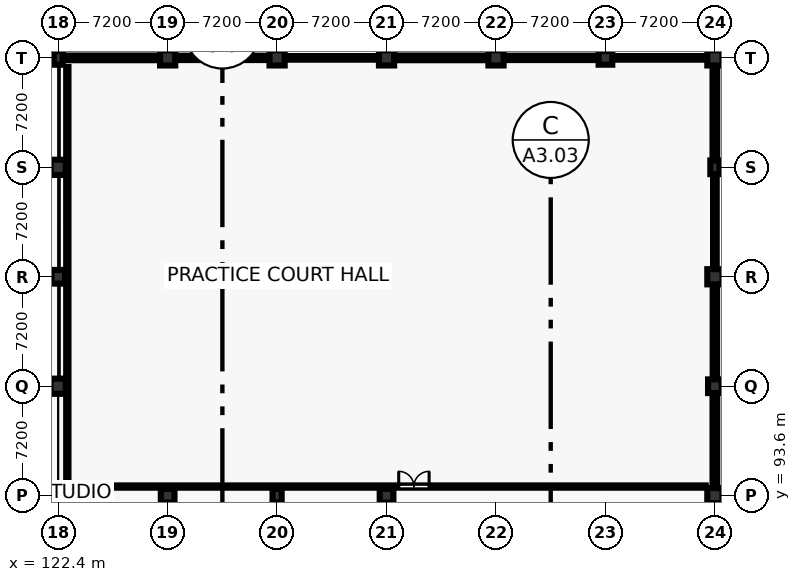
"""IFC4 building model, lengths in metres.
Left out: names, types, materials, properties, quantities, classifications, styles, units other than length and angle.
Written with IfcOpenShell. Run it as: python <this file> out.ifc"""

import sys

from ifc_helpers import new_model, si_unit, direction, frame, frame_2d, origin, origin_2d, place, context, subcontext, project, spatial, rectangle, circle, extrude, element, fill, save


model = new_model("IFC4")
c1 = context("Model", 3, precision=1e-05, world=origin(), true_north=direction((0.0, 1.0)))
c2 = subcontext(c1, "Body", "Model", "MODEL_VIEW")
j1 = project(units=[si_unit("LENGTHUNIT", "METRE"), si_unit("PLANEANGLEUNIT", "RADIAN")], contexts=[c1])
p1 = place(None, origin())
s1 = spatial("IfcSite", under=j1, at=p1, CompositionType="ELEMENT")
p2 = place(p1, origin())
s2 = spatial("IfcBuilding", under=s1, at=p2, CompositionType="ELEMENT")
p3 = place(p2, origin())
s3 = spatial("IfcBuildingStorey", under=s2, at=p3, CompositionType="ELEMENT", Elevation=0.0)
p4 = place(p3, frame((122.4, 93.6, 0.0), z_axis=(0.0, 0.0, 1.0), x_axis=(1.0, 0.0, 0.0)))
e1 = element("IfcColumn", 1, at=p4, inside=s3, PredefinedType="COLUMN", context=c2, shape_type="SweptSolid", body=[
    extrude(rectangle(XDim=0.6, YDim=0.9, at=origin_2d()), origin(), (0.0, 0.0, 1.0), 5.4),
])
p5 = place(p3, frame((122.4, 100.8, 0.0), z_axis=(0.0, 0.0, 1.0), x_axis=(1.0, 0.0, 0.0)))
e2 = element("IfcColumn", 2, at=p5, inside=s3, PredefinedType="COLUMN", context=c2, shape_type="SweptSolid", body=[
    extrude(rectangle(XDim=1.0, YDim=1.0, at=origin_2d()), origin(), (0.0, 0.0, 1.0), 5.4),
])
p6 = place(p3, frame((122.4, 108.0, 0.0), z_axis=(0.0, 0.0, 1.0), x_axis=(1.0, 0.0, 0.0)))
e3 = element("IfcColumn", 3, at=p6, inside=s3, PredefinedType="COLUMN", context=c2, shape_type="SweptSolid", body=[
    extrude(rectangle(XDim=0.9, YDim=0.9, at=origin_2d()), origin(), (0.0, 0.0, 1.0), 5.4),
])
p7 = place(p3, frame((122.4, 115.2, 0.0), z_axis=(0.0, 0.0, 1.0), x_axis=(1.0, 0.0, 0.0)))
e4 = element("IfcColumn", 4, at=p7, inside=s3, PredefinedType="COLUMN", context=c2, shape_type="SweptSolid", body=[
    extrude(circle(Radius=0.5, at=origin_2d()), origin(), (0.0, 0.0, 1.0), 5.4),
])
p8 = place(p3, frame((122.4, 122.4, 0.0), z_axis=(0.0, 0.0, 1.0), x_axis=(1.0, 0.0, 0.0)))
e5 = element("IfcColumn", 5, at=p8, inside=s3, PredefinedType="COLUMN", context=c2, shape_type="SweptSolid", body=[
    extrude(rectangle(XDim=0.6, YDim=0.9, at=origin_2d()), origin(), (0.0, 0.0, 1.0), 5.4),
])
p9 = place(p3, frame((129.6, 93.6, 0.0), z_axis=(0.0, 0.0, 1.0), x_axis=(1.0, 0.0, 0.0)))
e6 = element("IfcColumn", 6, at=p9, inside=s3, PredefinedType="COLUMN", context=c2, shape_type="SweptSolid", body=[
    extrude(rectangle(XDim=0.9, YDim=0.9, at=origin_2d()), origin(), (0.0, 0.0, 1.0), 5.4),
])
p10 = place(p3, frame((129.6, 122.4, 0.0), z_axis=(0.0, 0.0, 1.0), x_axis=(1.0, 0.0, 0.0)))
e7 = element("IfcColumn", 7, at=p10, inside=s3, PredefinedType="COLUMN", context=c2, shape_type="SweptSolid", body=[
    extrude(circle(Radius=0.5, at=origin_2d()), origin(), (0.0, 0.0, 1.0), 5.4),
])
p11 = place(p3, frame((136.8, 93.6, 0.0), z_axis=(0.0, 0.0, 1.0), x_axis=(1.0, 0.0, 0.0)))
e8 = element("IfcColumn", 8, at=p11, inside=s3, PredefinedType="COLUMN", context=c2, shape_type="SweptSolid", body=[
    extrude(rectangle(XDim=0.6, YDim=0.9, at=origin_2d()), origin(), (0.0, 0.0, 1.0), 5.4),
])
p12 = place(p3, frame((136.8, 122.4, 0.0), z_axis=(0.0, 0.0, 1.0), x_axis=(1.0, 0.0, 0.0)))
e9 = element("IfcColumn", 9, at=p12, inside=s3, PredefinedType="COLUMN", context=c2, shape_type="SweptSolid", body=[
    extrude(rectangle(XDim=1.0, YDim=1.0, at=origin_2d()), origin(), (0.0, 0.0, 1.0), 5.4),
])
p13 = place(p3, frame((144.0, 93.6, 0.0), z_axis=(0.0, 0.0, 1.0), x_axis=(1.0, 0.0, 0.0)))
e10 = element("IfcColumn", 10, at=p13, inside=s3, PredefinedType="COLUMN", context=c2, shape_type="SweptSolid", body=[
    extrude(rectangle(XDim=0.9, YDim=0.9, at=origin_2d()), origin(), (0.0, 0.0, 1.0), 5.4),
])
for number, where, z_axis, x_axis in (
    (11, (144.0, 122.4, 0.0), (0.0, 0.0, 1.0), (1.0, 0.0, 0.0)),
    (12, (151.2, 122.4, 0.0), (0.0, 0.0, 1.0), (1.0, 0.0, 0.0)),
):
    element("IfcColumn", number, at=place(p3, frame(where, z_axis=z_axis, x_axis=x_axis)), inside=s3, PredefinedType="COLUMN", context=c2, shape_type="SweptSolid", body=[
        extrude(circle(Radius=0.5, at=origin_2d()), origin(), (0.0, 0.0, 1.0), 5.4),
    ])
p14 = place(p3, frame((158.4, 122.4, 0.0), z_axis=(0.0, 0.0, 1.0), x_axis=(1.0, 0.0, 0.0)))
e13 = element("IfcColumn", 13, at=p14, inside=s3, PredefinedType="COLUMN", context=c2, shape_type="SweptSolid", body=[
    extrude(rectangle(XDim=0.9, YDim=0.9, at=origin_2d()), origin(), (0.0, 0.0, 1.0), 5.4),
])
p15 = place(p3, frame((165.6, 93.6, 0.0), z_axis=(0.0, 0.0, 1.0), x_axis=(1.0, 0.0, 0.0)))
e14 = element("IfcColumn", 14, at=p15, inside=s3, PredefinedType="COLUMN", context=c2, shape_type="SweptSolid", body=[
    extrude(rectangle(XDim=1.0, YDim=1.0, at=origin_2d()), origin(), (0.0, 0.0, 1.0), 5.4),
])
p16 = place(p3, frame((165.6, 100.8, 0.0), z_axis=(0.0, 0.0, 1.0), x_axis=(1.0, 0.0, 0.0)))
e15 = element("IfcColumn", 15, at=p16, inside=s3, PredefinedType="COLUMN", context=c2, shape_type="SweptSolid", body=[
    extrude(rectangle(XDim=0.9, YDim=0.9, at=origin_2d()), origin(), (0.0, 0.0, 1.0), 5.4),
])
p17 = place(p3, frame((165.6, 108.0, 0.0), z_axis=(0.0, 0.0, 1.0), x_axis=(1.0, 0.0, 0.0)))
e16 = element("IfcColumn", 16, at=p17, inside=s3, PredefinedType="COLUMN", context=c2, shape_type="SweptSolid", body=[
    extrude(circle(Radius=0.5, at=origin_2d()), origin(), (0.0, 0.0, 1.0), 5.4),
])
p18 = place(p3, frame((165.6, 115.2, 0.0), z_axis=(0.0, 0.0, 1.0), x_axis=(1.0, 0.0, 0.0)))
e17 = element("IfcColumn", 17, at=p18, inside=s3, PredefinedType="COLUMN", context=c2, shape_type="SweptSolid", body=[
    extrude(rectangle(XDim=0.6, YDim=0.9, at=origin_2d()), origin(), (0.0, 0.0, 1.0), 5.4),
])
p19 = place(p3, frame((165.6, 122.4, 0.0), z_axis=(0.0, 0.0, 1.0), x_axis=(1.0, 0.0, 0.0)))
e18 = element("IfcColumn", 18, at=p19, inside=s3, PredefinedType="COLUMN", context=c2, shape_type="SweptSolid", body=[
    extrude(rectangle(XDim=1.0, YDim=1.0, at=origin_2d()), origin(), (0.0, 0.0, 1.0), 5.4),
])
p20 = place(p3, frame((165.6, 122.4, 0.0), z_axis=(0.0, 0.0, 1.0), x_axis=(0.0, 1.0, 0.0)))
e19 = element("IfcWall", 19, at=p20, inside=s3, PredefinedType="SOLIDWALL", context=c2, shape_type="SweptSolid", body=[
    extrude(rectangle(XDim=6.9, YDim=0.34, at=frame_2d((3.45, 0.0))), origin(), (0.0, 0.0, 1.0), 4.85),
])
p21 = place(p20, frame((0.95, 0.0, 0.0)))
e20 = element("IfcOpeningElement", 20, at=p21, cuts=e19, PredefinedType="OPENING", context=c2, shape_type="SweptSolid", body=[
    extrude(rectangle(XDim=5.0, YDim=4.4, at=frame_2d((2.5, 2.2))), frame((0.0, 0.18, 0.0), z_axis=(0.0, -1.0, 0.0), x_axis=(1.0, 0.0, 0.0)), (0.0, 0.0, 1.0), 0.36),
])
p22 = place(p3, frame((115.55, 122.4, 0.0), z_axis=(0.0, 0.0, 1.0), x_axis=(1.0, 0.0, 0.0)))
e21 = element("IfcWall", 21, at=p22, inside=s3, PredefinedType="SOLIDWALL", context=c2, shape_type="SweptSolid", body=[
    extrude(rectangle(XDim=6.5, YDim=0.31, at=frame_2d((3.25, 0.0))), origin(), (0.0, 0.0, 1.0), 4.1),
])
p23 = place(p22, frame((2.3, 0.0, 0.0)))
e22 = element("IfcOpeningElement", 22, at=p23, cuts=e21, PredefinedType="OPENING", context=c2, shape_type="SweptSolid", body=[
    extrude(rectangle(XDim=1.9, YDim=2.4, at=frame_2d((0.95, 1.2))), frame((0.0, 0.165, 0.0), z_axis=(0.0, -1.0, 0.0), x_axis=(1.0, 0.0, 0.0)), (0.0, 0.0, 1.0), 0.33),
])
p24 = place(p3, frame((122.65, 122.4, 0.0), z_axis=(0.0, 0.0, 1.0), x_axis=(1.0, 0.0, 0.0)))
e23 = element("IfcWall", 23, at=p24, inside=s3, PredefinedType="SOLIDWALL", context=c2, shape_type="SweptSolid", body=[
    extrude(rectangle(XDim=6.7, YDim=0.31, at=frame_2d((3.35, 0.0))), origin(), (0.0, 0.0, 1.0), 4.1),
])
p25 = place(p24, frame((2.15, 0.0, 0.9)))
e24 = element("IfcOpeningElement", 24, at=p25, cuts=e23, PredefinedType="OPENING", context=c2, shape_type="SweptSolid", body=[
    extrude(rectangle(XDim=2.4, YDim=1.8, at=frame_2d((1.2, 0.9))), frame((0.0, 0.165, 0.0), z_axis=(0.0, -1.0, 0.0), x_axis=(1.0, 0.0, 0.0)), (0.0, 0.0, 1.0), 0.33),
])
p26 = place(p3, frame((129.85, 122.4, 0.0), z_axis=(0.0, 0.0, 1.0), x_axis=(1.0, 0.0, 0.0)))
e25 = element("IfcWall", 25, at=p26, inside=s3, PredefinedType="SOLIDWALL", context=c2, shape_type="SweptSolid", body=[
    extrude(rectangle(XDim=6.7, YDim=0.29, at=frame_2d((3.35, 0.0))), origin(), (0.0, 0.0, 1.0), 4.1),
])
p27 = place(p26, frame((2.3, 0.0, 0.9)))
e26 = element("IfcOpeningElement", 26, at=p27, cuts=e25, PredefinedType="OPENING", context=c2, shape_type="SweptSolid", body=[
    extrude(rectangle(XDim=2.1, YDim=1.8, at=frame_2d((1.05, 0.9))), frame((0.0, 0.155, 0.0), z_axis=(0.0, -1.0, 0.0), x_axis=(1.0, 0.0, 0.0)), (0.0, 0.0, 1.0), 0.31),
])
p28 = place(p3, frame((137.05, 122.4, 0.0), z_axis=(0.0, 0.0, 1.0), x_axis=(1.0, 0.0, 0.0)))
e27 = element("IfcWall", 27, at=p28, inside=s3, PredefinedType="SOLIDWALL", context=c2, shape_type="SweptSolid", body=[
    extrude(rectangle(XDim=6.7, YDim=0.24, at=frame_2d((3.35, 0.0))), origin(), (0.0, 0.0, 1.0), 4.1),
])
p29 = place(p28, frame((2.45, 0.0, 0.9)))
e28 = element("IfcOpeningElement", 28, at=p29, cuts=e27, PredefinedType="OPENING", context=c2, shape_type="SweptSolid", body=[
    extrude(rectangle(XDim=1.8, YDim=1.8, at=frame_2d((0.9, 0.9))), frame((0.0, 0.13, 0.0), z_axis=(0.0, -1.0, 0.0), x_axis=(1.0, 0.0, 0.0)), (0.0, 0.0, 1.0), 0.26),
])
p30 = place(p3, frame((144.25, 122.4, 0.0), z_axis=(0.0, 0.0, 1.0), x_axis=(1.0, 0.0, 0.0)))
e29 = element("IfcWall", 29, at=p30, inside=s3, PredefinedType="SOLIDWALL", context=c2, shape_type="SweptSolid", body=[
    extrude(rectangle(XDim=6.7, YDim=0.31, at=frame_2d((3.35, 0.0))), origin(), (0.0, 0.0, 1.0), 4.1),
])
p31 = place(p30, frame((2.45, 0.0, 0.9)))
e30 = element("IfcOpeningElement", 30, at=p31, cuts=e29, PredefinedType="OPENING", context=c2, shape_type="SweptSolid", body=[
    extrude(rectangle(XDim=1.8, YDim=1.5, at=frame_2d((0.9, 0.75))), frame((0.0, 0.165, 0.0), z_axis=(0.0, -1.0, 0.0), x_axis=(1.0, 0.0, 0.0)), (0.0, 0.0, 1.0), 0.33),
])
p32 = place(p3, frame((151.45, 122.4, 0.0), z_axis=(0.0, 0.0, 1.0), x_axis=(1.0, 0.0, 0.0)))
e31 = element("IfcWall", 31, at=p32, inside=s3, PredefinedType="SOLIDWALL", context=c2, shape_type="SweptSolid", body=[
    extrude(rectangle(XDim=6.7, YDim=0.29, at=frame_2d((3.35, 0.0))), origin(), (0.0, 0.0, 1.0), 4.1),
])
p33 = place(p32, frame((2.6, 0.0, 0.9)))
e32 = element("IfcOpeningElement", 32, at=p33, cuts=e31, PredefinedType="OPENING", context=c2, shape_type="SweptSolid", body=[
    extrude(rectangle(XDim=1.5, YDim=1.5, at=frame_2d((0.75, 0.75))), frame((0.0, 0.155, 0.0), z_axis=(0.0, -1.0, 0.0), x_axis=(1.0, 0.0, 0.0)), (0.0, 0.0, 1.0), 0.31),
])
p34 = place(p3, frame((158.65, 122.4, 0.0), z_axis=(0.0, 0.0, 1.0), x_axis=(1.0, 0.0, 0.0)))
e33 = element("IfcWall", 33, at=p34, inside=s3, PredefinedType="SOLIDWALL", context=c2, shape_type="SweptSolid", body=[
    extrude(rectangle(XDim=6.7, YDim=0.24, at=frame_2d((3.35, 0.0))), origin(), (0.0, 0.0, 1.0), 4.1),
])
p35 = place(p34, frame((2.75, 0.0, 0.9)))
e34 = element("IfcOpeningElement", 34, at=p35, cuts=e33, PredefinedType="OPENING", context=c2, shape_type="SweptSolid", body=[
    extrude(rectangle(XDim=1.2, YDim=1.5, at=frame_2d((0.6, 0.75))), frame((0.0, 0.13, 0.0), z_axis=(0.0, -1.0, 0.0), x_axis=(1.0, 0.0, 0.0)), (0.0, 0.0, 1.0), 0.26),
])
p36 = place(p3, frame((165.6, 93.85, 0.0), z_axis=(0.0, 0.0, 1.0), x_axis=(0.0, 1.0, 0.0)))
e35 = element("IfcWall", 35, at=p36, inside=s3, PredefinedType="SOLIDWALL", context=c2, shape_type="SweptSolid", body=[
    extrude(rectangle(XDim=6.7, YDim=0.31, at=frame_2d((3.35, 0.0))), origin(), (0.0, 0.0, 1.0), 4.1),
])
p37 = place(p36, frame((1.85, 0.0, 0.9)))
e36 = element("IfcOpeningElement", 36, at=p37, cuts=e35, PredefinedType="OPENING", context=c2, shape_type="SweptSolid", body=[
    extrude(rectangle(XDim=3.0, YDim=1.2, at=frame_2d((1.5, 0.6))), frame((0.0, 0.165, 0.0), z_axis=(0.0, -1.0, 0.0), x_axis=(1.0, 0.0, 0.0)), (0.0, 0.0, 1.0), 0.33),
])
p38 = place(p3, frame((165.6, 101.05, 0.0), z_axis=(0.0, 0.0, 1.0), x_axis=(0.0, 1.0, 0.0)))
e37 = element("IfcWall", 37, at=p38, inside=s3, PredefinedType="SOLIDWALL", context=c2, shape_type="SweptSolid", body=[
    extrude(rectangle(XDim=6.7, YDim=0.29, at=frame_2d((3.35, 0.0))), origin(), (0.0, 0.0, 1.0), 4.1),
])
p39 = place(p38, frame((2.0, 0.0, 0.9)))
e38 = element("IfcOpeningElement", 38, at=p39, cuts=e37, PredefinedType="OPENING", context=c2, shape_type="SweptSolid", body=[
    extrude(rectangle(XDim=2.7, YDim=1.2, at=frame_2d((1.35, 0.6))), frame((0.0, 0.155, 0.0), z_axis=(0.0, -1.0, 0.0), x_axis=(1.0, 0.0, 0.0)), (0.0, 0.0, 1.0), 0.31),
])
p40 = place(p3, frame((165.6, 108.25, 0.0), z_axis=(0.0, 0.0, 1.0), x_axis=(0.0, 1.0, 0.0)))
e39 = element("IfcWall", 39, at=p40, inside=s3, PredefinedType="SOLIDWALL", context=c2, shape_type="SweptSolid", body=[
    extrude(rectangle(XDim=6.7, YDim=0.24, at=frame_2d((3.35, 0.0))), origin(), (0.0, 0.0, 1.0), 4.1),
])
p41 = place(p40, frame((2.15, 0.0, 0.9)))
e40 = element("IfcOpeningElement", 40, at=p41, cuts=e39, PredefinedType="OPENING", context=c2, shape_type="SweptSolid", body=[
    extrude(rectangle(XDim=2.4, YDim=1.1, at=frame_2d((1.2, 0.55))), frame((0.0, 0.13, 0.0), z_axis=(0.0, -1.0, 0.0), x_axis=(1.0, 0.0, 0.0)), (0.0, 0.0, 1.0), 0.26),
])
p42 = place(p3, frame((165.6, 115.45, 0.0), z_axis=(0.0, 0.0, 1.0), x_axis=(0.0, 1.0, 0.0)))
e41 = element("IfcWall", 41, at=p42, inside=s3, PredefinedType="SOLIDWALL", context=c2, shape_type="SweptSolid", body=[
    extrude(rectangle(XDim=6.7, YDim=0.31, at=frame_2d((3.35, 0.0))), origin(), (0.0, 0.0, 1.0), 4.1),
])
p43 = place(p42, frame((2.35, 0.0, 0.9)))
e42 = element("IfcOpeningElement", 42, at=p43, cuts=e41, PredefinedType="OPENING", context=c2, shape_type="SweptSolid", body=[
    extrude(rectangle(XDim=2.0, YDim=1.1, at=frame_2d((1.0, 0.55))), frame((0.0, 0.165, 0.0), z_axis=(0.0, -1.0, 0.0), x_axis=(1.0, 0.0, 0.0)), (0.0, 0.0, 1.0), 0.33),
])
p44 = place(p3, frame((123.0, 94.2, 0.0), z_axis=(0.0, 0.0, 1.0), x_axis=(1.0, 0.0, 0.0)))
e43 = element("IfcWall", 43, at=p44, inside=s3, PredefinedType="PARTITIONING", context=c2, shape_type="SweptSolid", body=[
    extrude(rectangle(XDim=42.0, YDim=0.15, at=frame_2d((21.0, 0.0))), origin(), (0.0, 0.0, 1.0), 4.1),
])
p45 = place(p44, frame((21.8, 0.0, 0.0)))
e44 = element("IfcOpeningElement", 44, at=p45, cuts=e43, PredefinedType="OPENING", context=c2, shape_type="SweptSolid", body=[
    extrude(rectangle(XDim=2.0, YDim=2.4, at=frame_2d((1.0, 1.2))), frame((0.0, 0.085, 0.0), z_axis=(0.0, -1.0, 0.0), x_axis=(1.0, 0.0, 0.0)), (0.0, 0.0, 1.0), 0.17),
])
p46 = place(p3, frame((123.0, 121.8, 0.0), z_axis=(0.0, 0.0, 1.0), x_axis=(0.0, -1.0, 0.0)))
e45 = element("IfcWall", 45, at=p46, inside=s3, PredefinedType="PARTITIONING", context=c2, shape_type="SweptSolid", body=[
    extrude(rectangle(XDim=27.6, YDim=0.15, at=frame_2d((13.8, 0.0))), origin(), (0.0, 0.0, 1.0), 4.1),
])
p47 = place(p25, origin())
e46 = element("IfcWindow", 46, at=p47, inside=s3, PartitioningType="SINGLE_PANEL", PredefinedType="WINDOW", context=c2, shape_type="SweptSolid", body=[
    extrude(rectangle(XDim=2.4, YDim=1.8, at=frame_2d((1.2, 0.9))), frame((0.0, 0.03, 0.0), z_axis=(0.0, -1.0, 0.0), x_axis=(1.0, 0.0, 0.0)), (0.0, 0.0, 1.0), 0.06),
])
fill(e24, e46)
p48 = place(p27, origin())
e47 = element("IfcWindow", 47, at=p48, inside=s3, PartitioningType="SINGLE_PANEL", PredefinedType="WINDOW", context=c2, shape_type="SweptSolid", body=[
    extrude(rectangle(XDim=2.1, YDim=1.8, at=frame_2d((1.05, 0.9))), frame((0.0, 0.03, 0.0), z_axis=(0.0, -1.0, 0.0), x_axis=(1.0, 0.0, 0.0)), (0.0, 0.0, 1.0), 0.06),
])
fill(e26, e47)
p49 = place(p29, origin())
e48 = element("IfcWindow", 48, at=p49, inside=s3, PartitioningType="SINGLE_PANEL", PredefinedType="WINDOW", context=c2, shape_type="SweptSolid", body=[
    extrude(rectangle(XDim=1.8, YDim=1.8, at=frame_2d((0.9, 0.9))), frame((0.0, 0.03, 0.0), z_axis=(0.0, -1.0, 0.0), x_axis=(1.0, 0.0, 0.0)), (0.0, 0.0, 1.0), 0.06),
])
fill(e28, e48)
p50 = place(p31, origin())
e49 = element("IfcWindow", 49, at=p50, inside=s3, PartitioningType="SINGLE_PANEL", PredefinedType="WINDOW", context=c2, shape_type="SweptSolid", body=[
    extrude(rectangle(XDim=1.8, YDim=1.5, at=frame_2d((0.9, 0.75))), frame((0.0, 0.03, 0.0), z_axis=(0.0, -1.0, 0.0), x_axis=(1.0, 0.0, 0.0)), (0.0, 0.0, 1.0), 0.06),
])
fill(e30, e49)
p51 = place(p33, origin())
e50 = element("IfcWindow", 50, at=p51, inside=s3, PartitioningType="SINGLE_PANEL", PredefinedType="WINDOW", context=c2, shape_type="SweptSolid", body=[
    extrude(rectangle(XDim=1.5, YDim=1.5, at=frame_2d((0.75, 0.75))), frame((0.0, 0.03, 0.0), z_axis=(0.0, -1.0, 0.0), x_axis=(1.0, 0.0, 0.0)), (0.0, 0.0, 1.0), 0.06),
])
fill(e32, e50)
p52 = place(p35, origin())
e51 = element("IfcWindow", 51, at=p52, inside=s3, PartitioningType="SINGLE_PANEL", PredefinedType="WINDOW", context=c2, shape_type="SweptSolid", body=[
    extrude(rectangle(XDim=1.2, YDim=1.5, at=frame_2d((0.6, 0.75))), frame((0.0, 0.03, 0.0), z_axis=(0.0, -1.0, 0.0), x_axis=(1.0, 0.0, 0.0)), (0.0, 0.0, 1.0), 0.06),
])
fill(e34, e51)
p53 = place(p37, origin())
e52 = element("IfcWindow", 52, at=p53, inside=s3, PartitioningType="SINGLE_PANEL", PredefinedType="WINDOW", context=c2, shape_type="SweptSolid", body=[
    extrude(rectangle(XDim=3.0, YDim=1.2, at=frame_2d((1.5, 0.6))), frame((0.0, 0.03, 0.0), z_axis=(0.0, -1.0, 0.0), x_axis=(1.0, 0.0, 0.0)), (0.0, 0.0, 1.0), 0.06),
])
fill(e36, e52)
p54 = place(p39, origin())
e53 = element("IfcWindow", 53, at=p54, inside=s3, PartitioningType="SINGLE_PANEL", PredefinedType="WINDOW", context=c2, shape_type="SweptSolid", body=[
    extrude(rectangle(XDim=2.7, YDim=1.2, at=frame_2d((1.35, 0.6))), frame((0.0, 0.03, 0.0), z_axis=(0.0, -1.0, 0.0), x_axis=(1.0, 0.0, 0.0)), (0.0, 0.0, 1.0), 0.06),
])
fill(e38, e53)
p55 = place(p41, origin())
e54 = element("IfcWindow", 54, at=p55, inside=s3, PartitioningType="SINGLE_PANEL", PredefinedType="WINDOW", context=c2, shape_type="SweptSolid", body=[
    extrude(rectangle(XDim=2.4, YDim=1.1, at=frame_2d((1.2, 0.55))), frame((0.0, 0.03, 0.0), z_axis=(0.0, -1.0, 0.0), x_axis=(1.0, 0.0, 0.0)), (0.0, 0.0, 1.0), 0.06),
])
fill(e40, e54)
p56 = place(p43, origin())
e55 = element("IfcWindow", 55, at=p56, inside=s3, PartitioningType="SINGLE_PANEL", PredefinedType="WINDOW", context=c2, shape_type="SweptSolid", body=[
    extrude(rectangle(XDim=2.0, YDim=1.1, at=frame_2d((1.0, 0.55))), frame((0.0, 0.03, 0.0), z_axis=(0.0, -1.0, 0.0), x_axis=(1.0, 0.0, 0.0)), (0.0, 0.0, 1.0), 0.06),
])
fill(e42, e55)
p57 = place(p45, origin())
e56 = element("IfcDoor", 56, at=p57, inside=s3, OperationType="DOUBLE_DOOR_SINGLE_SWING", PredefinedType="DOOR", context=c2, shape_type="SweptSolid", body=[
    extrude(rectangle(XDim=2.0, YDim=2.4, at=frame_2d((1.0, 1.2))), frame((0.0, 0.025, 0.0), z_axis=(0.0, -1.0, 0.0), x_axis=(1.0, 0.0, 0.0)), (0.0, 0.0, 1.0), 0.05),
])
fill(e44, e56)
save(model, sys.argv[1])
